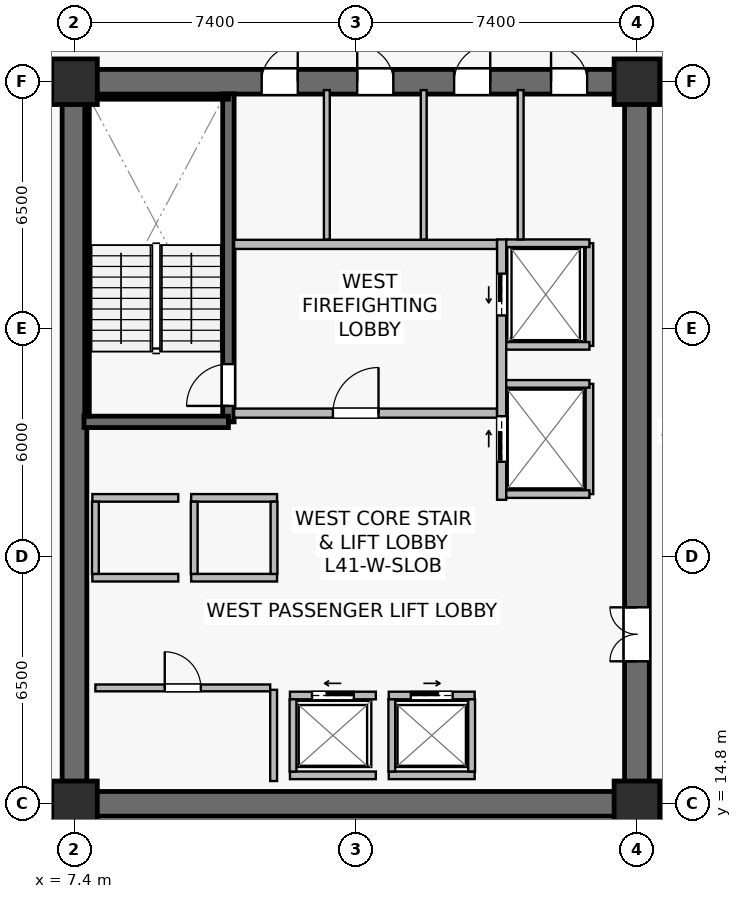
"""IFC4 building model, lengths in metres.
Left out: names, types, materials, properties, quantities, classifications, styles, units other than length and angle.
Written with IfcOpenShell. Run it as: python <this file> out.ifc"""

import sys

from ifc_helpers import new_model, si_unit, direction, frame, frame_2d, origin, origin_2d, place, context, subcontext, project, spatial, rectangle, extrude, source, transform, mapped, element, fill, save


model = new_model("IFC4")
c1 = context("Model", 3, precision=1e-05, world=origin(), true_north=direction((0.0, 1.0)))
c2 = subcontext(c1, "Body", "Model", "MODEL_VIEW")
j1 = project(units=[si_unit("LENGTHUNIT", "METRE"), si_unit("PLANEANGLEUNIT", "RADIAN")], contexts=[c1])
p1 = place(None, origin())
s1 = spatial("IfcSite", under=j1, at=p1, CompositionType="ELEMENT")
p2 = place(p1, origin())
s2 = spatial("IfcBuilding", under=s1, at=p2, CompositionType="ELEMENT")
p3 = place(p2, frame((0.0, 0.0, 170.7)))
s3 = spatial("IfcBuildingStorey", under=s2, at=p3, CompositionType="ELEMENT", Elevation=170.7)
p4 = place(p3, frame((7.075, 14.8, 0.0), z_axis=(0.0, 0.0, 1.0), x_axis=(1.0, 0.0, 0.0)))
e1 = element("IfcWall", 1, at=p4, inside=s3, PredefinedType="SHEAR", context=c2, shape_type="SweptSolid", body=[
    extrude(rectangle(XDim=15.45, YDim=0.65, at=frame_2d((7.725, 0.0))), origin(), (0.0, 0.0, 1.0), 3.79),
])
p5 = place(p3, frame((7.075, 33.8, 0.0), z_axis=(0.0, 0.0, 1.0), x_axis=(1.0, 0.0, 0.0)))
e2 = element("IfcWall", 2, at=p5, inside=s3, PredefinedType="SHEAR", context=c2, shape_type="SweptSolid", body=[
    extrude(rectangle(XDim=15.45, YDim=0.65, at=frame_2d((7.725, 0.0))), origin(), (0.0, 0.0, 1.0), 3.79),
])
p6 = place(p5, frame((5.25, 0.0, 0.0)))
e3 = element("IfcOpeningElement", 3, at=p6, cuts=e2, PredefinedType="OPENING", context=c2, shape_type="SweptSolid", body=[
    extrude(rectangle(XDim=0.95, YDim=2.15, at=frame_2d((0.475, 1.075))), frame((0.0, 0.335, 0.0), z_axis=(0.0, -1.0, 0.0), x_axis=(1.0, 0.0, 0.0)), (0.0, 0.0, 1.0), 0.67),
])
p7 = place(p5, frame((7.765, 0.0, 0.0)))
e4 = element("IfcOpeningElement", 4, at=p7, cuts=e2, PredefinedType="OPENING", context=c2, shape_type="SweptSolid", body=[
    extrude(rectangle(XDim=0.95, YDim=2.15, at=frame_2d((0.475, 1.075))), frame((0.0, 0.335, 0.0), z_axis=(0.0, -1.0, 0.0), x_axis=(1.0, 0.0, 0.0)), (0.0, 0.0, 1.0), 0.67),
])
p8 = place(p5, frame((10.315, 0.0, 0.0)))
e5 = element("IfcOpeningElement", 5, at=p8, cuts=e2, PredefinedType="OPENING", context=c2, shape_type="SweptSolid", body=[
    extrude(rectangle(XDim=0.95, YDim=2.15, at=frame_2d((0.475, 1.075))), frame((0.0, 0.335, 0.0), z_axis=(0.0, -1.0, 0.0), x_axis=(1.0, 0.0, 0.0)), (0.0, 0.0, 1.0), 0.67),
])
p9 = place(p5, frame((12.865, 0.0, 0.0)))
e6 = element("IfcOpeningElement", 6, at=p9, cuts=e2, PredefinedType="OPENING", context=c2, shape_type="SweptSolid", body=[
    extrude(rectangle(XDim=0.95, YDim=2.15, at=frame_2d((0.475, 1.075))), frame((0.0, 0.335, 0.0), z_axis=(0.0, -1.0, 0.0), x_axis=(1.0, 0.0, 0.0)), (0.0, 0.0, 1.0), 0.67),
])
p10 = place(p3, frame((7.4, 15.125, 0.0), z_axis=(0.0, 0.0, 1.0), x_axis=(0.0, 1.0, 0.0)))
e7 = element("IfcWall", 7, at=p10, inside=s3, PredefinedType="SHEAR", context=c2, shape_type="SweptSolid", body=[
    extrude(rectangle(XDim=18.35, YDim=0.65, at=frame_2d((9.175, 0.0))), origin(), (0.0, 0.0, 1.0), 3.79),
])
p11 = place(p3, frame((22.2, 15.125, 0.0), z_axis=(0.0, 0.0, 1.0), x_axis=(0.0, 1.0, 0.0)))
e8 = element("IfcWall", 8, at=p11, inside=s3, PredefinedType="SHEAR", context=c2, shape_type="SweptSolid", body=[
    extrude(rectangle(XDim=18.35, YDim=0.65, at=frame_2d((9.175, 0.0))), origin(), (0.0, 0.0, 1.0), 3.79),
])
p12 = place(p11, frame((3.425, 0.0, 0.0)))
e9 = element("IfcOpeningElement", 9, at=p12, cuts=e8, PredefinedType="OPENING", context=c2, shape_type="SweptSolid", body=[
    extrude(rectangle(XDim=1.42, YDim=2.2, at=frame_2d((0.71, 1.1))), frame((0.0, 0.335, 0.0), z_axis=(0.0, -1.0, 0.0), x_axis=(1.0, 0.0, 0.0)), (0.0, 0.0, 1.0), 0.67),
])
p13 = place(p3, frame((11.45, 24.85, 0.0), z_axis=(0.0, 0.0, 1.0), x_axis=(0.0, 1.0, 0.0)))
e10 = element("IfcWall", 10, at=p13, inside=s3, PredefinedType="SHEAR", context=c2, shape_type="SweptSolid", body=[
    extrude(rectangle(XDim=8.63, YDim=0.3, at=frame_2d((4.315, 0.0))), origin(), (0.0, 0.0, 1.0), 3.79),
])
p14 = place(p13, frame((0.42, 0.0, 0.0)))
e11 = element("IfcOpeningElement", 11, at=p14, cuts=e10, PredefinedType="OPENING", context=c2, shape_type="SweptSolid", body=[
    extrude(rectangle(XDim=1.1, YDim=2.15, at=frame_2d((0.55, 1.075))), frame((0.0, 0.16, 0.0), z_axis=(0.0, -1.0, 0.0), x_axis=(1.0, 0.0, 0.0)), (0.0, 0.0, 1.0), 0.32),
])
p15 = place(p3, frame((7.65, 24.85, 0.0), z_axis=(0.0, 0.0, 1.0), x_axis=(1.0, 0.0, 0.0)))
e12 = element("IfcWall", 12, at=p15, inside=s3, PredefinedType="SHEAR", context=c2, shape_type="SweptSolid", body=[
    extrude(rectangle(XDim=3.8, YDim=0.3, at=frame_2d((1.9, 0.0))), origin(), (0.0, 0.0, 1.0), 3.79),
])
p16 = place(p3, frame((7.73, 33.4, 0.0), z_axis=(0.0, 0.0, 1.0), x_axis=(1.0, 0.0, 0.0)))
e13 = element("IfcWall", 13, at=p16, inside=s3, PredefinedType="SOLIDWALL", context=c2, shape_type="SweptSolid", body=[
    extrude(rectangle(XDim=3.72, YDim=0.12, at=frame_2d((1.86, 0.0))), origin(), (0.0, 0.0, 1.0), 3.79),
])
p17 = place(p3, frame((7.73, 25.0, 0.0), z_axis=(0.0, 0.0, 1.0), x_axis=(0.0, 1.0, 0.0)))
e14 = element("IfcWall", 14, at=p17, inside=s3, PredefinedType="SOLIDWALL", context=c2, shape_type="SweptSolid", body=[
    extrude(rectangle(XDim=8.32, YDim=0.12, at=frame_2d((4.16, 0.0))), origin(), (0.0, 0.0, 1.0), 3.79),
])
m1 = source(origin(), c2, "Body", "SweptSolid", [
    extrude(rectangle(XDim=1.2, YDim=1.2, at=origin_2d()), origin(), (0.0, 0.0, 1.0), 4.1),
])
for number, where, z_axis, x_axis in (
    (15, (7.4, 14.8, 0.0), (0.0, 0.0, 1.0), (1.0, 0.0, 0.0)),
    (16, (22.2, 14.8, 0.0), (0.0, 0.0, 1.0), (1.0, 0.0, 0.0)),
    (17, (7.4, 33.8, 0.0), (0.0, 0.0, 1.0), (1.0, 0.0, 0.0)),
    (18, (22.2, 33.8, 0.0), (0.0, 0.0, 1.0), (1.0, 0.0, 0.0)),
):
    element("IfcColumn", number, at=place(p3, frame(where, z_axis=z_axis, x_axis=x_axis)), inside=s3, PredefinedType="COLUMN", context=c2, shape_type="MappedRepresentation", body=[
        mapped(m1, transform((0.0, 0.0, 0.0), scale=1.0)),
    ])
p18 = place(p3, frame((11.6, 25.08, 0.0), z_axis=(0.0, 0.0, 1.0), x_axis=(1.0, 0.0, 0.0)))
e19 = element("IfcWall", 19, at=p18, inside=s3, PredefinedType="SOLIDWALL", context=c2, shape_type="SweptSolid", body=[
    extrude(rectangle(XDim=6.92, YDim=0.24, at=frame_2d((3.46, 0.0))), origin(), (0.0, 0.0, 1.0), 3.187),
])
p19 = place(p18, frame((2.6, 0.0, 0.0)))
e20 = element("IfcOpeningElement", 20, at=p19, cuts=e19, PredefinedType="OPENING", context=c2, shape_type="SweptSolid", body=[
    extrude(rectangle(XDim=1.2, YDim=2.16, at=frame_2d((0.6, 1.08))), frame((0.0, 0.13, 0.0), z_axis=(0.0, -1.0, 0.0), x_axis=(1.0, 0.0, 0.0)), (0.0, 0.0, 1.0), 0.26),
])
p20 = place(p3, frame((11.6, 29.52, 0.0), z_axis=(0.0, 0.0, 1.0), x_axis=(1.0, 0.0, 0.0)))
e21 = element("IfcWall", 21, at=p20, inside=s3, PredefinedType="SOLIDWALL", context=c2, shape_type="SweptSolid", body=[
    extrude(rectangle(XDim=6.92, YDim=0.24, at=frame_2d((3.46, 0.0))), origin(), (0.0, 0.0, 1.0), 3.187),
])
p21 = place(p3, frame((18.64, 22.8, 0.0), z_axis=(0.0, 0.0, 1.0), x_axis=(0.0, 1.0, 0.0)))
e22 = element("IfcWall", 22, at=p21, inside=s3, PredefinedType="SOLIDWALL", context=c2, shape_type="SweptSolid", body=[
    extrude(rectangle(XDim=6.85, YDim=0.24, at=frame_2d((3.425, 0.0))), origin(), (0.0, 0.0, 1.0), 2.925),
])
p22 = place(p21, frame((4.85, 0.0, 0.0)))
e23 = element("IfcOpeningElement", 23, at=p22, cuts=e22, PredefinedType="OPENING", context=c2, shape_type="SweptSolid", body=[
    extrude(rectangle(XDim=1.1, YDim=2.22, at=frame_2d((0.55, 1.11))), frame((0.0, 0.13, 0.0), z_axis=(0.0, -1.0, 0.0), x_axis=(1.0, 0.0, 0.0)), (0.0, 0.0, 1.0), 0.26),
])
p23 = place(p21, frame((1.0, 0.0, 0.0)))
e24 = element("IfcOpeningElement", 24, at=p23, cuts=e22, PredefinedType="OPENING", context=c2, shape_type="SweptSolid", body=[
    extrude(rectangle(XDim=1.2, YDim=2.22, at=frame_2d((0.6, 1.11))), frame((0.0, 0.13, 0.0), z_axis=(0.0, -1.0, 0.0), x_axis=(1.0, 0.0, 0.0)), (0.0, 0.0, 1.0), 0.26),
])
p24 = place(p3, frame((13.07, 17.65, 0.0), z_axis=(0.0, 0.0, 1.0), x_axis=(1.0, 0.0, 0.0)))
e25 = element("IfcWall", 25, at=p24, inside=s3, PredefinedType="SOLIDWALL", context=c2, shape_type="SweptSolid", body=[
    extrude(rectangle(XDim=2.26, YDim=0.2, at=frame_2d((1.13, 0.0))), origin(), (0.0, 0.0, 1.0), 3.187),
])
p25 = place(p24, frame((0.58, 0.0, 0.0)))
e26 = element("IfcOpeningElement", 26, at=p25, cuts=e25, PredefinedType="OPENING", context=c2, shape_type="SweptSolid", body=[
    extrude(rectangle(XDim=1.1, YDim=2.22, at=frame_2d((0.55, 1.11))), frame((0.0, 0.11, 0.0), z_axis=(0.0, -1.0, 0.0), x_axis=(1.0, 0.0, 0.0)), (0.0, 0.0, 1.0), 0.22),
])
p26 = place(p3, frame((13.07, 15.55, 0.0), z_axis=(0.0, 0.0, 1.0), x_axis=(1.0, 0.0, 0.0)))
e27 = element("IfcWall", 27, at=p26, inside=s3, PredefinedType="SOLIDWALL", context=c2, shape_type="SweptSolid", body=[
    extrude(rectangle(XDim=2.26, YDim=0.2, at=frame_2d((1.13, 0.0))), origin(), (0.0, 0.0, 1.0), 3.187),
])
p27 = place(p3, frame((13.15, 15.65, 0.0), z_axis=(0.0, 0.0, 1.0), x_axis=(0.0, 1.0, 0.0)))
e28 = element("IfcWall", 28, at=p27, inside=s3, PredefinedType="SOLIDWALL", context=c2, shape_type="SweptSolid", body=[
    extrude(rectangle(XDim=1.9, YDim=0.18, at=frame_2d((0.95, 0.0))), origin(), (0.0, 0.0, 1.0), 3.79),
])
p28 = place(p3, frame((15.67, 17.65, 0.0), z_axis=(0.0, 0.0, 1.0), x_axis=(1.0, 0.0, 0.0)))
e29 = element("IfcWall", 29, at=p28, inside=s3, PredefinedType="SOLIDWALL", context=c2, shape_type="SweptSolid", body=[
    extrude(rectangle(XDim=2.26, YDim=0.2, at=frame_2d((1.13, 0.0))), origin(), (0.0, 0.0, 1.0), 3.79),
])
p29 = place(p28, frame((0.58, 0.0, 0.0)))
e30 = element("IfcOpeningElement", 30, at=p29, cuts=e29, PredefinedType="OPENING", context=c2, shape_type="SweptSolid", body=[
    extrude(rectangle(XDim=1.1, YDim=2.22, at=frame_2d((0.55, 1.11))), frame((0.0, 0.11, 0.0), z_axis=(0.0, -1.0, 0.0), x_axis=(1.0, 0.0, 0.0)), (0.0, 0.0, 1.0), 0.22),
])
p30 = place(p3, frame((15.67, 15.55, 0.0), z_axis=(0.0, 0.0, 1.0), x_axis=(1.0, 0.0, 0.0)))
e31 = element("IfcWall", 31, at=p30, inside=s3, PredefinedType="SOLIDWALL", context=c2, shape_type="SweptSolid", body=[
    extrude(rectangle(XDim=2.26, YDim=0.2, at=frame_2d((1.13, 0.0))), origin(), (0.0, 0.0, 1.0), 3.79),
])
for number, where, z_axis, x_axis in (
    (32, (15.75, 15.65, 0.0), (0.0, 0.0, 1.0), (0.0, 1.0, 0.0)),
    (33, (17.85, 15.65, 0.0), (0.0, 0.0, 1.0), (0.0, 1.0, 0.0)),
):
    element("IfcWall", number, at=place(p3, frame(where, z_axis=z_axis, x_axis=x_axis)), inside=s3, PredefinedType="SOLIDWALL", context=c2, shape_type="SweptSolid", body=[
        extrude(rectangle(XDim=1.9, YDim=0.18, at=frame_2d((0.95, 0.0))), origin(), (0.0, 0.0, 1.0), 3.79),
    ])
for number, where, z_axis, x_axis in (
    (34, (7.87, 20.75, 0.0), (0.0, 0.0, 1.0), (1.0, 0.0, 0.0)),
    (35, (7.87, 22.85, 0.0), (0.0, 0.0, 1.0), (1.0, 0.0, 0.0)),
):
    element("IfcWall", number, at=place(p3, frame(where, z_axis=z_axis, x_axis=x_axis)), inside=s3, PredefinedType="SOLIDWALL", context=c2, shape_type="SweptSolid", body=[
        extrude(rectangle(XDim=2.26, YDim=0.2, at=frame_2d((1.13, 0.0))), origin(), (0.0, 0.0, 1.0), 3.79),
    ])
p31 = place(p3, frame((7.95, 20.85, 0.0), z_axis=(0.0, 0.0, 1.0), x_axis=(0.0, 1.0, 0.0)))
e36 = element("IfcWall", 36, at=p31, inside=s3, PredefinedType="SOLIDWALL", context=c2, shape_type="SweptSolid", body=[
    extrude(rectangle(XDim=1.9, YDim=0.18, at=frame_2d((0.95, 0.0))), origin(), (0.0, 0.0, 1.0), 3.79),
])
for number, where, z_axis, x_axis in (
    (37, (10.47, 20.75, 0.0), (0.0, 0.0, 1.0), (1.0, 0.0, 0.0)),
    (38, (10.47, 22.85, 0.0), (0.0, 0.0, 1.0), (1.0, 0.0, 0.0)),
):
    element("IfcWall", number, at=place(p3, frame(where, z_axis=z_axis, x_axis=x_axis)), inside=s3, PredefinedType="SOLIDWALL", context=c2, shape_type="SweptSolid", body=[
        extrude(rectangle(XDim=2.26, YDim=0.2, at=frame_2d((1.13, 0.0))), origin(), (0.0, 0.0, 1.0), 3.79),
    ])
for number, where, z_axis, x_axis in (
    (39, (10.55, 20.85, 0.0), (0.0, 0.0, 1.0), (0.0, 1.0, 0.0)),
    (40, (12.65, 20.85, 0.0), (0.0, 0.0, 1.0), (0.0, 1.0, 0.0)),
):
    element("IfcWall", number, at=place(p3, frame(where, z_axis=z_axis, x_axis=x_axis)), inside=s3, PredefinedType="SOLIDWALL", context=c2, shape_type="SweptSolid", body=[
        extrude(rectangle(XDim=1.9, YDim=0.18, at=frame_2d((0.95, 0.0))), origin(), (0.0, 0.0, 1.0), 3.79),
    ])
p32 = place(p3, frame((20.95, 26.85, 0.0), z_axis=(0.0, 0.0, 1.0), x_axis=(0.0, 1.0, 0.0)))
e41 = element("IfcWall", 41, at=p32, inside=s3, PredefinedType="SOLIDWALL", context=c2, shape_type="SweptSolid", body=[
    extrude(rectangle(XDim=2.7, YDim=0.2, at=frame_2d((1.35, 0.0))), origin(), (0.0, 0.0, 1.0), 3.79),
])
p33 = place(p3, frame((18.76, 29.55, 0.0), z_axis=(0.0, 0.0, 1.0), x_axis=(1.0, 0.0, 0.0)))
e42 = element("IfcWall", 42, at=p33, inside=s3, PredefinedType="SOLIDWALL", context=c2, shape_type="SweptSolid", body=[
    extrude(rectangle(XDim=2.19, YDim=0.2, at=frame_2d((1.095, 0.0))), origin(), (0.0, 0.0, 1.0), 3.79),
])
p34 = place(p3, frame((18.76, 26.85, 0.0), z_axis=(0.0, 0.0, 1.0), x_axis=(1.0, 0.0, 0.0)))
e43 = element("IfcWall", 43, at=p34, inside=s3, PredefinedType="SOLIDWALL", context=c2, shape_type="SweptSolid", body=[
    extrude(rectangle(XDim=2.19, YDim=0.2, at=frame_2d((1.095, 0.0))), origin(), (0.0, 0.0, 1.0), 3.187),
])
p35 = place(p3, frame((20.95, 22.95, 0.0), z_axis=(0.0, 0.0, 1.0), x_axis=(0.0, 1.0, 0.0)))
e44 = element("IfcWall", 44, at=p35, inside=s3, PredefinedType="SOLIDWALL", context=c2, shape_type="SweptSolid", body=[
    extrude(rectangle(XDim=2.9, YDim=0.2, at=frame_2d((1.45, 0.0))), origin(), (0.0, 0.0, 1.0), 2.925),
])
for number, where, z_axis, x_axis in (
    (45, (18.76, 25.85, 0.0), (0.0, 0.0, 1.0), (1.0, 0.0, 0.0)),
    (46, (18.76, 22.95, 0.0), (0.0, 0.0, 1.0), (1.0, 0.0, 0.0)),
):
    element("IfcWall", number, at=place(p3, frame(where, z_axis=z_axis, x_axis=x_axis)), inside=s3, PredefinedType="SOLIDWALL", context=c2, shape_type="SweptSolid", body=[
        extrude(rectangle(XDim=2.19, YDim=0.2, at=frame_2d((1.095, 0.0))), origin(), (0.0, 0.0, 1.0), 3.79),
    ])
p36 = place(p3, frame((7.95, 17.85, 0.0), z_axis=(0.0, 0.0, 1.0), x_axis=(1.0, 0.0, 0.0)))
e47 = element("IfcWall", 47, at=p36, inside=s3, PredefinedType="SOLIDWALL", context=c2, shape_type="SweptSolid", body=[
    extrude(rectangle(XDim=4.6, YDim=0.18, at=frame_2d((2.3, 0.0))), origin(), (0.0, 0.0, 1.0), 3.79),
])
p37 = place(p36, frame((1.825, 0.0, 0.0)))
e48 = element("IfcOpeningElement", 48, at=p37, cuts=e47, PredefinedType="OPENING", context=c2, shape_type="SweptSolid", body=[
    extrude(rectangle(XDim=0.95, YDim=2.15, at=frame_2d((0.475, 1.075))), frame((0.0, 0.1, 0.0), z_axis=(0.0, -1.0, 0.0), x_axis=(1.0, 0.0, 0.0)), (0.0, 0.0, 1.0), 0.2),
])
p38 = place(p3, frame((12.64, 15.4, 0.0), z_axis=(0.0, 0.0, 1.0), x_axis=(0.0, 1.0, 0.0)))
e49 = element("IfcWall", 49, at=p38, inside=s3, PredefinedType="SOLIDWALL", context=c2, shape_type="SweptSolid", body=[
    extrude(rectangle(XDim=2.4, YDim=0.18, at=frame_2d((1.2, 0.0))), origin(), (0.0, 0.0, 1.0), 3.79),
])
for number, where, z_axis, x_axis in (
    (50, (14.04, 29.65, 0.0), (0.0, 0.0, 1.0), (0.0, 1.0, 0.0)),
    (51, (16.59, 29.65, 0.0), (0.0, 0.0, 1.0), (0.0, 1.0, 0.0)),
    (52, (19.14, 29.65, 0.0), (0.0, 0.0, 1.0), (0.0, 1.0, 0.0)),
):
    element("IfcWall", number, at=place(p3, frame(where, z_axis=z_axis, x_axis=x_axis)), inside=s3, PredefinedType="PLUMBINGWALL", context=c2, shape_type="SweptSolid", body=[
        extrude(rectangle(XDim=3.93, YDim=0.155, at=frame_2d((1.965, 0.0))), origin(), (0.0, 0.0, 1.0), 3.79),
    ])
m2 = source(origin(), c2, "Body", "SweptSolid", [
    extrude(rectangle(XDim=1.1, YDim=2.15, at=frame_2d((0.55, 1.075))), frame((0.0, 0.025, 0.0), z_axis=(0.0, -1.0, 0.0), x_axis=(1.0, 0.0, 0.0)), (0.0, 0.0, 1.0), 0.05),
])
p39 = place(p14, origin())
e53 = element("IfcDoor", 53, at=p39, inside=s3, OperationType="SINGLE_SWING_LEFT", PredefinedType="DOOR", context=c2, shape_type="MappedRepresentation", body=[
    mapped(m2, transform((0.0, 0.0, 0.0), scale=1.0)),
])
fill(e11, e53)
m3 = source(origin(), c2, "Body", "SweptSolid", [
    extrude(rectangle(XDim=1.2, YDim=2.16, at=frame_2d((0.6, 1.08))), frame((0.0, 0.025, 0.0), z_axis=(0.0, -1.0, 0.0), x_axis=(1.0, 0.0, 0.0)), (0.0, 0.0, 1.0), 0.05),
])
p40 = place(p19, origin())
e54 = element("IfcDoor", 54, at=p40, inside=s3, OperationType="SINGLE_SWING_RIGHT", PredefinedType="DOOR", context=c2, shape_type="MappedRepresentation", body=[
    mapped(m3, transform((0.0, 0.0, 0.0), scale=1.0)),
])
fill(e20, e54)
m4 = source(origin(), c2, "Body", "SweptSolid", [
    extrude(rectangle(XDim=1.1, YDim=2.22, at=frame_2d((0.55, 1.11))), frame((0.0, 0.025, 0.0), z_axis=(0.0, -1.0, 0.0), x_axis=(1.0, 0.0, 0.0)), (0.0, 0.0, 1.0), 0.05),
])
p41 = place(p25, origin())
e55 = element("IfcDoor", 55, at=p41, inside=s3, OperationType="SLIDING_TO_LEFT", PredefinedType="USERDEFINED", context=c2, shape_type="MappedRepresentation", body=[
    mapped(m4, transform((0.0, 0.0, 0.0), scale=1.0)),
])
fill(e26, e55)
p42 = place(p29, origin())
e56 = element("IfcDoor", 56, at=p42, inside=s3, OperationType="SLIDING_TO_RIGHT", PredefinedType="USERDEFINED", context=c2, shape_type="MappedRepresentation", body=[
    mapped(m4, transform((0.0, 0.0, 0.0), scale=1.0)),
])
fill(e30, e56)
p43 = place(p22, origin())
e57 = element("IfcDoor", 57, at=p43, inside=s3, OperationType="SLIDING_TO_LEFT", PredefinedType="USERDEFINED", context=c2, shape_type="MappedRepresentation", body=[
    mapped(m4, transform((0.0, 0.0, 0.0), scale=1.0)),
])
fill(e23, e57)
m5 = source(origin(), c2, "Body", "SweptSolid", [
    extrude(rectangle(XDim=1.2, YDim=2.22, at=frame_2d((0.6, 1.11))), frame((0.0, 0.025, 0.0), z_axis=(0.0, -1.0, 0.0), x_axis=(1.0, 0.0, 0.0)), (0.0, 0.0, 1.0), 0.05),
])
p44 = place(p23, origin())
e58 = element("IfcDoor", 58, at=p44, inside=s3, OperationType="SLIDING_TO_RIGHT", PredefinedType="USERDEFINED", context=c2, shape_type="MappedRepresentation", body=[
    mapped(m5, transform((0.0, 0.0, 0.0), scale=1.0)),
])
fill(e24, e58)
m6 = source(origin(), c2, "Body", "SweptSolid", [
    extrude(rectangle(XDim=0.95, YDim=2.15, at=frame_2d((0.475, 1.075))), frame((0.0, 0.025, 0.0), z_axis=(0.0, -1.0, 0.0), x_axis=(1.0, 0.0, 0.0)), (0.0, 0.0, 1.0), 0.05),
])
p45 = place(p37, origin())
e59 = element("IfcDoor", 59, at=p45, inside=s3, OperationType="SINGLE_SWING_LEFT", PredefinedType="DOOR", context=c2, shape_type="MappedRepresentation", body=[
    mapped(m6, transform((0.0, 0.0, 0.0), scale=1.0)),
])
fill(e48, e59)
m7 = source(origin(), c2, "Body", "SweptSolid", [
    extrude(rectangle(XDim=1.42, YDim=2.2, at=frame_2d((0.71, 1.1))), frame((0.0, 0.025, 0.0), z_axis=(0.0, -1.0, 0.0), x_axis=(1.0, 0.0, 0.0)), (0.0, 0.0, 1.0), 0.05),
])
p46 = place(p12, origin())
e60 = element("IfcDoor", 60, at=p46, inside=s3, OperationType="DOUBLE_DOOR_SINGLE_SWING", PredefinedType="DOOR", context=c2, shape_type="MappedRepresentation", body=[
    mapped(m7, transform((0.0, 0.0, 0.0), scale=1.0)),
])
fill(e9, e60)
p47 = place(p6, origin())
e61 = element("IfcDoor", 61, at=p47, inside=s3, OperationType="SINGLE_SWING_RIGHT", PredefinedType="DOOR", context=c2, shape_type="MappedRepresentation", body=[
    mapped(m6, transform((0.0, 0.0, 0.0), scale=1.0)),
])
fill(e3, e61)
p48 = place(p7, origin())
e62 = element("IfcDoor", 62, at=p48, inside=s3, OperationType="SINGLE_SWING_LEFT", PredefinedType="DOOR", context=c2, shape_type="MappedRepresentation", body=[
    mapped(m6, transform((0.0, 0.0, 0.0), scale=1.0)),
])
fill(e4, e62)
p49 = place(p8, origin())
e63 = element("IfcDoor", 63, at=p49, inside=s3, OperationType="SINGLE_SWING_RIGHT", PredefinedType="DOOR", context=c2, shape_type="MappedRepresentation", body=[
    mapped(m6, transform((0.0, 0.0, 0.0), scale=1.0)),
])
fill(e5, e63)
p50 = place(p9, origin())
e64 = element("IfcDoor", 64, at=p50, inside=s3, OperationType="SINGLE_SWING_LEFT", PredefinedType="DOOR", context=c2, shape_type="MappedRepresentation", body=[
    mapped(m6, transform((0.0, 0.0, 0.0), scale=1.0)),
])
fill(e6, e64)
save(model, sys.argv[1])
